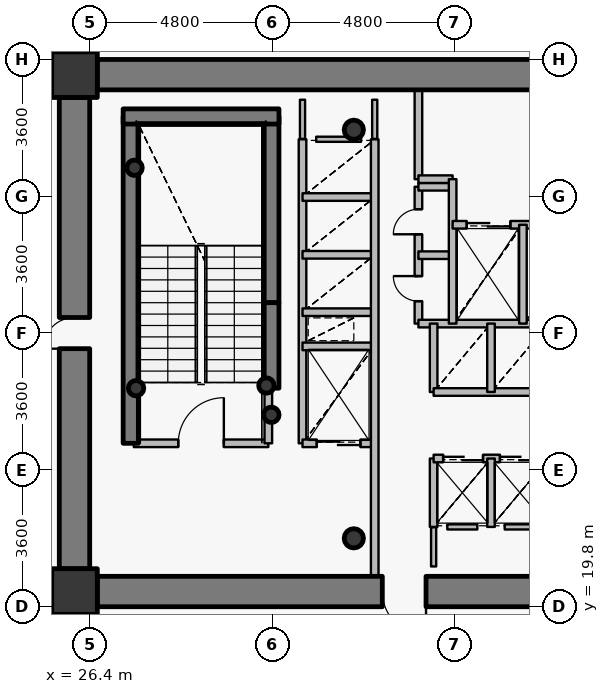
"""IFC4 building model, lengths in metres.
Left out: names, types, materials, properties, quantities, classifications, styles, units other than length and angle.
Written with IfcOpenShell. Run it as: python <this file> out.ifc"""

import sys

from ifc_helpers import new_model, si_unit, direction, frame, frame_2d, origin, origin_2d, place, context, subcontext, project, spatial, rectangle, hollow_circle, extrude, source, transform, mapped, element, fill, save


model = new_model("IFC4")
c1 = context("Model", 3, precision=1e-05, world=origin(), true_north=direction((0.0, 1.0)))
c2 = subcontext(c1, "Body", "Model", "MODEL_VIEW")
j1 = project(units=[si_unit("LENGTHUNIT", "METRE"), si_unit("PLANEANGLEUNIT", "RADIAN")], contexts=[c1])
p1 = place(None, origin())
s1 = spatial("IfcSite", under=j1, at=p1, CompositionType="ELEMENT")
p2 = place(p1, origin())
s2 = spatial("IfcBuilding", under=s1, at=p2, CompositionType="ELEMENT")
p3 = place(p2, frame((0.0, 0.0, 100.95)))
s3 = spatial("IfcBuildingStorey", under=s2, at=p3, CompositionType="ELEMENT", Elevation=100.95)
for number, where, z_axis, x_axis in (
    (1, (26.0, 20.2, 0.0), (0.0, 0.0, 1.0), (1.0, 0.0, 0.0)),
    (2, (26.0, 33.8, 0.0), (0.0, 0.0, 1.0), (1.0, 0.0, 0.0)),
):
    element("IfcColumn", number, at=place(p3, frame(where, z_axis=z_axis, x_axis=x_axis)), inside=s3, PredefinedType="COLUMN", context=c2, shape_type="SweptSolid", body=[
        extrude(rectangle(XDim=1.2, YDim=1.2, at=origin_2d()), origin(), (0.0, 0.0, 1.0), 3.75),
    ])
for number, where, z_axis, x_axis in (
    (3, (33.35, 21.6, 0.0), (0.0, 0.0, 1.0), (1.0, 0.0, 0.0)),
    (4, (33.35, 32.35, 0.0), (0.0, 0.0, 1.0), (1.0, 0.0, 0.0)),
):
    element("IfcColumn", number, at=place(p3, frame(where, z_axis=z_axis, x_axis=x_axis)), inside=s3, PredefinedType="COLUMN", context=c2, shape_type="SweptSolid", body=[
        extrude(hollow_circle(Radius=0.254, WallThickness=0.02, at=origin_2d()), origin(), (0.0, 0.0, 1.0), 3.75),
    ])
p4 = place(p3, frame((27.48, 24.1, 0.0), z_axis=(0.0, 0.0, 1.0), x_axis=(0.0, 1.0, 0.0)))
e5 = element("IfcWall", 5, at=p4, inside=s3, PredefinedType="SHEAR", context=c2, shape_type="SweptSolid", body=[
    extrude(rectangle(XDim=8.6, YDim=0.4, at=frame_2d((4.3, 0.0))), origin(), (0.0, 0.0, 1.0), 3.75),
])
p5 = place(p3, frame((31.18, 27.8, 0.0), z_axis=(0.0, 0.0, 1.0), x_axis=(0.0, 1.0, 0.0)))
e6 = element("IfcWall", 6, at=p5, inside=s3, PredefinedType="SHEAR", context=c2, shape_type="SweptSolid", body=[
    extrude(rectangle(XDim=4.9, YDim=0.4, at=frame_2d((2.45, 0.0))), origin(), (0.0, 0.0, 1.0), 3.75),
])
p6 = place(p3, frame((27.28, 32.7, 0.0), z_axis=(0.0, 0.0, 1.0), x_axis=(1.0, 0.0, 0.0)))
e7 = element("IfcWall", 7, at=p6, inside=s3, PredefinedType="SHEAR", context=c2, shape_type="SweptSolid", body=[
    extrude(rectangle(XDim=4.1, YDim=0.4, at=frame_2d((2.05, 0.0))), origin(), (0.0, 0.0, 1.0), 3.75),
])
for number, where, z_axis, x_axis in (
    (8, (27.58, 31.35, 0.0), (0.0, 0.0, 1.0), (1.0, 0.0, 0.0)),
    (9, (31.05, 25.62, 0.0), (0.0, 0.0, 1.0), (1.0, 0.0, 0.0)),
    (10, (31.18, 24.85, 0.0), (0.0, 0.0, 1.0), (1.0, 0.0, 0.0)),
    (11, (27.62, 25.55, 0.0), (0.0, 0.0, 1.0), (1.0, 0.0, 0.0)),
):
    element("IfcColumn", number, at=place(p3, frame(where, z_axis=z_axis, x_axis=x_axis)), inside=s3, PredefinedType="COLUMN", context=c2, shape_type="SweptSolid", body=[
        extrude(hollow_circle(Radius=0.203, WallThickness=0.016, at=origin_2d()), origin(), (0.0, 0.0, 1.0), 3.75),
    ])
p7 = place(p3, frame((26.6, 33.8, 0.0), z_axis=(0.0, 0.0, 1.0), x_axis=(1.0, 0.0, 0.0)))
e12 = element("IfcWall", 12, at=p7, inside=s3, PredefinedType="SHEAR", context=c2, shape_type="SweptSolid", body=[
    extrude(rectangle(XDim=18.8, YDim=0.8, at=frame_2d((9.4, 0.0))), origin(), (0.0, 0.0, 1.0), 2.95),
])
p8 = place(p3, frame((45.4, 20.2, 0.0), z_axis=(0.0, 0.0, 1.0), x_axis=(-1.0, 0.0, 0.0)))
e13 = element("IfcWall", 13, at=p8, inside=s3, PredefinedType="SHEAR", context=c2, shape_type="SweptSolid", body=[
    extrude(rectangle(XDim=18.8, YDim=0.8, at=frame_2d((9.4, 0.0))), origin(), (0.0, 0.0, 1.0), 2.95),
])
p9 = place(p8, frame((10.15, 0.0, 0.0)))
e14 = element("IfcOpeningElement", 14, at=p9, cuts=e13, PredefinedType="OPENING", context=c2, shape_type="SweptSolid", body=[
    extrude(rectangle(XDim=1.15, YDim=2.15, at=origin_2d()), frame((0.575, 0.41, 1.075), z_axis=(0.0, -1.0, 0.0), x_axis=(1.0, 0.0, 0.0)), (0.0, 0.0, 1.0), 0.82),
])
p10 = place(p3, frame((26.0, 20.8, 0.0), z_axis=(0.0, 0.0, 1.0), x_axis=(0.0, 1.0, 0.0)))
e15 = element("IfcWall", 15, at=p10, inside=s3, PredefinedType="SHEAR", context=c2, shape_type="SweptSolid", body=[
    extrude(rectangle(XDim=12.4, YDim=0.8, at=frame_2d((6.2, 0.0))), origin(), (0.0, 0.0, 1.0), 2.95),
])
p11 = place(p10, frame((5.79, 0.0, 0.0)))
e16 = element("IfcOpeningElement", 16, at=p11, cuts=e15, PredefinedType="OPENING", context=c2, shape_type="SweptSolid", body=[
    extrude(rectangle(XDim=0.82, YDim=2.1, at=origin_2d()), frame((0.41, 0.41, 1.05), z_axis=(0.0, -1.0, 0.0), x_axis=(1.0, 0.0, 0.0)), (0.0, 0.0, 1.0), 0.82),
])
p12 = place(p3, frame((31.18, 25.55, 0.0), z_axis=(0.0, 0.0, 1.0), x_axis=(0.0, 1.0, 0.0)))
e17 = element("IfcWall", 17, at=p12, inside=s3, PredefinedType="SHEAR", context=c2, shape_type="SweptSolid", body=[
    extrude(rectangle(XDim=2.25, YDim=0.4, at=frame_2d((1.125, 0.0))), origin(), (0.0, 0.0, 1.0), 3.1),
])
p13 = place(p3, frame((27.56, 24.1, 0.0), z_axis=(0.0, 0.0, 1.0), x_axis=(1.0, 0.0, 0.0)))
e18 = element("IfcWall", 18, at=p13, inside=s3, PredefinedType="PARTITIONING", context=c2, shape_type="SweptSolid", body=[
    extrude(rectangle(XDim=3.54, YDim=0.2, at=frame_2d((1.77, 0.0))), origin(), (0.0, 0.0, 1.0), 3.5),
])
p14 = place(p13, frame((1.17, 0.0, 0.0)))
e19 = element("IfcOpeningElement", 19, at=p14, cuts=e18, PredefinedType="OPENING", context=c2, shape_type="SweptSolid", body=[
    extrude(rectangle(XDim=1.2, YDim=2.15, at=origin_2d()), frame((0.6, 0.11, 1.075), z_axis=(0.0, -1.0, 0.0), x_axis=(1.0, 0.0, 0.0)), (0.0, 0.0, 1.0), 0.22),
])
p15 = place(p3, frame((31.1, 24.1, 0.0), z_axis=(0.0, 0.0, 1.0), x_axis=(0.0, 1.0, 0.0)))
e20 = element("IfcWall", 20, at=p15, inside=s3, PredefinedType="PARTITIONING", context=c2, shape_type="SweptSolid", body=[
    extrude(rectangle(XDim=1.44, YDim=0.2, at=frame_2d((0.72, 0.0))), origin(), (0.0, 0.0, 1.0), 3.5),
])
p16 = place(p3, frame((32.0, 24.1, 0.0), z_axis=(0.0, 0.0, 1.0), x_axis=(0.0, 1.0, 0.0)))
e21 = element("IfcWall", 21, at=p16, inside=s3, PredefinedType="PARTITIONING", context=c2, shape_type="SweptSolid", body=[
    extrude(rectangle(XDim=8.0, YDim=0.2, at=frame_2d((4.0, 0.0))), origin(), (0.0, 0.0, 1.0), 3.5),
])
p17 = place(p3, frame((32.0, 24.1, 0.0), z_axis=(0.0, 0.0, 1.0), x_axis=(1.0, 0.0, 0.0)))
e22 = element("IfcWall", 22, at=p17, inside=s3, PredefinedType="PARTITIONING", context=c2, shape_type="SweptSolid", body=[
    extrude(rectangle(XDim=1.9, YDim=0.2, at=frame_2d((0.95, 0.0))), origin(), (0.0, 0.0, 1.0), 3.085),
])
p18 = place(p17, frame((0.375, 0.0, 0.0)))
e23 = element("IfcOpeningElement", 23, at=p18, cuts=e22, PredefinedType="OPENING", context=c2, shape_type="SweptSolid", body=[
    extrude(rectangle(XDim=1.15, YDim=2.15, at=origin_2d()), frame((0.575, 0.11, 1.075), z_axis=(0.0, -1.0, 0.0), x_axis=(1.0, 0.0, 0.0)), (0.0, 0.0, 1.0), 0.22),
])
for number, where, z_axis, x_axis in (
    (24, (32.0, 26.65, 0.0), (0.0, 0.0, 1.0), (1.0, 0.0, 0.0)),
    (25, (32.0, 27.55, 0.0), (0.0, 0.0, 1.0), (1.0, 0.0, 0.0)),
    (26, (32.0, 29.06, 0.0), (0.0, 0.0, 1.0), (1.0, 0.0, 0.0)),
    (27, (32.0, 30.58, 0.0), (0.0, 0.0, 1.0), (1.0, 0.0, 0.0)),
):
    element("IfcWall", number, at=place(p3, frame(where, z_axis=z_axis, x_axis=x_axis)), inside=s3, PredefinedType="PARTITIONING", context=c2, shape_type="SweptSolid", body=[
        extrude(rectangle(XDim=1.9, YDim=0.2, at=frame_2d((0.95, 0.0))), origin(), (0.0, 0.0, 1.0), 3.085),
    ])
p19 = place(p3, frame((33.9, 20.6, 0.0), z_axis=(0.0, 0.0, 1.0), x_axis=(0.0, 1.0, 0.0)))
e28 = element("IfcWall", 28, at=p19, inside=s3, PredefinedType="PARTITIONING", context=c2, shape_type="SweptSolid", body=[
    extrude(rectangle(XDim=11.5, YDim=0.2, at=frame_2d((5.75, 0.0))), origin(), (0.0, 0.0, 1.0), 3.085),
])
p20 = place(p3, frame((35.05, 27.25, 0.0), z_axis=(0.0, 0.0, 1.0), x_axis=(0.0, 1.0, 0.0)))
e29 = element("IfcWall", 29, at=p20, inside=s3, PredefinedType="PARTITIONING", context=c2, shape_type="SweptSolid", body=[
    extrude(rectangle(XDim=3.6, YDim=0.2, at=frame_2d((1.8, 0.0))), origin(), (0.0, 0.0, 1.0), 3.5),
])
p21 = place(p20, frame((0.59, 0.0, 0.0)))
e30 = element("IfcOpeningElement", 30, at=p21, cuts=e29, PredefinedType="OPENING", context=c2, shape_type="SweptSolid", body=[
    extrude(rectangle(XDim=0.66, YDim=2.05, at=origin_2d()), frame((0.33, 0.11, 1.025), z_axis=(0.0, -1.0, 0.0), x_axis=(1.0, 0.0, 0.0)), (0.0, 0.0, 1.0), 0.22),
])
p22 = place(p20, frame((2.35, 0.0, 0.0)))
e31 = element("IfcOpeningElement", 31, at=p22, cuts=e29, PredefinedType="OPENING", context=c2, shape_type="SweptSolid", body=[
    extrude(rectangle(XDim=0.66, YDim=2.05, at=origin_2d()), frame((0.33, 0.11, 1.025), z_axis=(0.0, -1.0, 0.0), x_axis=(1.0, 0.0, 0.0)), (0.0, 0.0, 1.0), 0.22),
])
p23 = place(p3, frame((35.05, 27.25, 0.0), z_axis=(0.0, 0.0, 1.0), x_axis=(1.0, 0.0, 0.0)))
e32 = element("IfcWall", 32, at=p23, inside=s3, PredefinedType="PARTITIONING", context=c2, shape_type="SweptSolid", body=[
    extrude(rectangle(XDim=4.95, YDim=0.2, at=frame_2d((2.475, 0.0))), origin(), (0.0, 0.0, 1.0), 3.085),
])
for number, where, z_axis, x_axis in (
    (33, (35.05, 29.05, 0.0), (0.0, 0.0, 1.0), (1.0, 0.0, 0.0)),
    (34, (35.05, 30.85, 0.0), (0.0, 0.0, 1.0), (1.0, 0.0, 0.0)),
):
    element("IfcWall", number, at=place(p3, frame(where, z_axis=z_axis, x_axis=x_axis)), inside=s3, PredefinedType="PARTITIONING", context=c2, shape_type="SweptSolid", body=[
        extrude(rectangle(XDim=0.9, YDim=0.2, at=frame_2d((0.45, 0.0))), origin(), (0.0, 0.0, 1.0), 3.5),
    ])
p24 = place(p3, frame((35.05, 31.05, 0.0), z_axis=(0.0, 0.0, 1.0), x_axis=(0.0, 1.0, 0.0)))
e35 = element("IfcWall", 35, at=p24, inside=s3, PredefinedType="PARTITIONING", context=c2, shape_type="SweptSolid", body=[
    extrude(rectangle(XDim=2.35, YDim=0.2, at=frame_2d((1.175, 0.0))), origin(), (0.0, 0.0, 1.0), 3.085),
])
p25 = place(p3, frame((35.05, 31.05, 0.0), z_axis=(0.0, 0.0, 1.0), x_axis=(1.0, 0.0, 0.0)))
e36 = element("IfcWall", 36, at=p25, inside=s3, PredefinedType="PARTITIONING", context=c2, shape_type="SweptSolid", body=[
    extrude(rectangle(XDim=0.9, YDim=0.2, at=frame_2d((0.45, 0.0))), origin(), (0.0, 0.0, 1.0), 3.5),
])
p26 = place(p3, frame((35.45, 21.9, 0.0), z_axis=(0.0, 0.0, 1.0), x_axis=(0.0, 1.0, 0.0)))
e37 = element("IfcWall", 37, at=p26, inside=s3, PredefinedType="PARTITIONING", context=c2, shape_type="SweptSolid", body=[
    extrude(rectangle(XDim=1.8, YDim=0.2, at=frame_2d((0.9, 0.0))), origin(), (0.0, 0.0, 1.0), 3.5),
])
p27 = place(p3, frame((35.45, 23.7, 0.0), z_axis=(0.0, 0.0, 1.0), x_axis=(1.0, 0.0, 0.0)))
e38 = element("IfcWall", 38, at=p27, inside=s3, PredefinedType="PARTITIONING", context=c2, shape_type="SweptSolid", body=[
    extrude(rectangle(XDim=4.55, YDim=0.2, at=frame_2d((2.275, 0.0))), origin(), (0.0, 0.0, 1.0), 3.085),
])
p28 = place(p27, frame((0.25, 0.0, 0.0)))
e39 = element("IfcOpeningElement", 39, at=p28, cuts=e38, PredefinedType="OPENING", context=c2, shape_type="SweptSolid", body=[
    extrude(rectangle(XDim=1.05, YDim=2.15, at=origin_2d()), frame((0.525, 0.11, 1.075), z_axis=(0.0, -1.0, 0.0), x_axis=(1.0, 0.0, 0.0)), (0.0, 0.0, 1.0), 0.22),
])
p29 = place(p27, frame((1.745, 0.0, 0.0)))
e40 = element("IfcOpeningElement", 40, at=p29, cuts=e38, PredefinedType="OPENING", context=c2, shape_type="SweptSolid", body=[
    extrude(rectangle(XDim=1.05, YDim=2.15, at=origin_2d()), frame((0.525, 0.11, 1.075), z_axis=(0.0, -1.0, 0.0), x_axis=(1.0, 0.0, 0.0)), (0.0, 0.0, 1.0), 0.22),
])
p30 = place(p27, frame((3.165, 0.0, 0.0)))
e41 = element("IfcOpeningElement", 41, at=p30, cuts=e38, PredefinedType="OPENING", context=c2, shape_type="SweptSolid", body=[
    extrude(rectangle(XDim=1.05, YDim=2.15, at=origin_2d()), frame((0.525, 0.11, 1.075), z_axis=(0.0, -1.0, 0.0), x_axis=(1.0, 0.0, 0.0)), (0.0, 0.0, 1.0), 0.22),
])
p31 = place(p3, frame((35.45, 25.45, 0.0), z_axis=(0.0, 0.0, 1.0), x_axis=(0.0, 1.0, 0.0)))
e42 = element("IfcWall", 42, at=p31, inside=s3, PredefinedType="PARTITIONING", context=c2, shape_type="SweptSolid", body=[
    extrude(rectangle(XDim=1.8, YDim=0.2, at=frame_2d((0.9, 0.0))), origin(), (0.0, 0.0, 1.0), 3.5),
])
p32 = place(p3, frame((35.45, 25.45, 0.0), z_axis=(0.0, 0.0, 1.0), x_axis=(1.0, 0.0, 0.0)))
e43 = element("IfcWall", 43, at=p32, inside=s3, PredefinedType="PARTITIONING", context=c2, shape_type="SweptSolid", body=[
    extrude(rectangle(XDim=4.55, YDim=0.2, at=frame_2d((2.275, 0.0))), origin(), (0.0, 0.0, 1.0), 3.085),
])
p33 = place(p3, frame((35.95, 27.25, 0.0), z_axis=(0.0, 0.0, 1.0), x_axis=(0.0, 1.0, 0.0)))
e44 = element("IfcWall", 44, at=p33, inside=s3, PredefinedType="PARTITIONING", context=c2, shape_type="SweptSolid", body=[
    extrude(rectangle(XDim=3.8, YDim=0.2, at=frame_2d((1.9, 0.0))), origin(), (0.0, 0.0, 1.0), 3.5),
])
p34 = place(p3, frame((35.95, 29.85, 0.0), z_axis=(0.0, 0.0, 1.0), x_axis=(1.0, 0.0, 0.0)))
e45 = element("IfcWall", 45, at=p34, inside=s3, PredefinedType="PARTITIONING", context=c2, shape_type="SweptSolid", body=[
    extrude(rectangle(XDim=8.49, YDim=0.2, at=frame_2d((4.245, 0.0))), origin(), (0.0, 0.0, 1.0), 3.085),
])
p35 = place(p34, frame((6.1, 0.0, 0.0)))
e46 = element("IfcOpeningElement", 46, at=p35, cuts=e45, PredefinedType="OPENING", context=c2, shape_type="SweptSolid", body=[
    extrude(rectangle(XDim=1.2, YDim=2.15, at=origin_2d()), frame((0.6, 0.11, 1.075), z_axis=(0.0, -1.0, 0.0), x_axis=(1.0, 0.0, 0.0)), (0.0, 0.0, 1.0), 0.22),
])
p36 = place(p34, frame((0.37, 0.0, 0.0)))
e47 = element("IfcOpeningElement", 47, at=p36, cuts=e45, PredefinedType="OPENING", context=c2, shape_type="SweptSolid", body=[
    extrude(rectangle(XDim=1.15, YDim=2.15, at=origin_2d()), frame((0.575, 0.11, 1.075), z_axis=(0.0, -1.0, 0.0), x_axis=(1.0, 0.0, 0.0)), (0.0, 0.0, 1.0), 0.22),
])
p37 = place(p34, frame((2.425, 0.0, 0.0)))
e48 = element("IfcOpeningElement", 48, at=p37, cuts=e45, PredefinedType="OPENING", context=c2, shape_type="SweptSolid", body=[
    extrude(rectangle(XDim=1.05, YDim=2.15, at=origin_2d()), frame((0.525, 0.11, 1.075), z_axis=(0.0, -1.0, 0.0), x_axis=(1.0, 0.0, 0.0)), (0.0, 0.0, 1.0), 0.22),
])
for number, where, z_axis, x_axis in (
    (49, (36.96, 21.9, 0.0), (0.0, 0.0, 1.0), (0.0, 1.0, 0.0)),
    (50, (36.96, 25.45, 0.0), (0.0, 0.0, 1.0), (0.0, 1.0, 0.0)),
):
    element("IfcWall", number, at=place(p3, frame(where, z_axis=z_axis, x_axis=x_axis)), inside=s3, PredefinedType="PARTITIONING", context=c2, shape_type="SweptSolid", body=[
        extrude(rectangle(XDim=1.8, YDim=0.2, at=frame_2d((0.9, 0.0))), origin(), (0.0, 0.0, 1.0), 3.5),
    ])
p38 = place(p3, frame((37.8, 27.25, 0.0), z_axis=(0.0, 0.0, 1.0), x_axis=(0.0, 1.0, 0.0)))
e51 = element("IfcWall", 51, at=p38, inside=s3, PredefinedType="PARTITIONING", context=c2, shape_type="SweptSolid", body=[
    extrude(rectangle(XDim=2.6, YDim=0.2, at=frame_2d((1.3, 0.0))), origin(), (0.0, 0.0, 1.0), 3.5),
])
p39 = place(p3, frame((36.6, 21.9, 0.0), z_axis=(0.0, 0.0, 1.0), x_axis=(-1.0, 0.0, 0.0)))
e52 = element("IfcWall", 52, at=p39, inside=s3, PredefinedType="PARTITIONING", context=c2, shape_type="SweptSolid", body=[
    extrude(rectangle(XDim=0.79, YDim=0.135, at=frame_2d((0.395, 0.0))), origin(), (0.0, 0.0, 1.0), 3.5),
])
p40 = place(p3, frame((38.12, 21.9, 0.0), z_axis=(0.0, 0.0, 1.0), x_axis=(-1.0, 0.0, 0.0)))
e53 = element("IfcWall", 53, at=p40, inside=s3, PredefinedType="PARTITIONING", context=c2, shape_type="SweptSolid", body=[
    extrude(rectangle(XDim=0.8, YDim=0.135, at=frame_2d((0.4, 0.0))), origin(), (0.0, 0.0, 1.0), 3.5),
])
p41 = place(p3, frame((32.36, 32.1, 0.0), z_axis=(0.0, 0.0, 1.0), x_axis=(1.0, 0.0, 0.0)))
e54 = element("IfcWall", 54, at=p41, inside=s3, PredefinedType="PARTITIONING", context=c2, shape_type="SweptSolid", body=[
    extrude(rectangle(XDim=1.18, YDim=0.135, at=frame_2d((0.59, 0.0))), origin(), (0.0, 0.0, 1.0), 3.085),
])
p42 = place(p3, frame((32.0, 33.14, 0.0), z_axis=(0.0, 0.0, 1.0), x_axis=(0.0, -1.0, 0.0)))
e55 = element("IfcWall", 55, at=p42, inside=s3, PredefinedType="PARTITIONING", context=c2, shape_type="SweptSolid", body=[
    extrude(rectangle(XDim=1.03, YDim=0.135, at=frame_2d((0.515, 0.0))), origin(), (0.0, 0.0, 1.0), 3.035),
])
for number, where, z_axis, x_axis in (
    (56, (35.45, 21.89, 0.0), (0.0, 0.0, 1.0), (0.0, -1.0, 0.0)),
    (57, (33.9, 32.11, 0.0), (0.0, 0.0, 1.0), (0.0, 1.0, 0.0)),
):
    element("IfcWall", number, at=place(p3, frame(where, z_axis=z_axis, x_axis=x_axis)), inside=s3, PredefinedType="PARTITIONING", context=c2, shape_type="SweptSolid", body=[
        extrude(rectangle(XDim=1.03, YDim=0.135, at=frame_2d((0.515, 0.0))), origin(), (0.0, 0.0, 1.0), 3.085),
    ])
p43 = place(p3, frame((26.59, 34.2, 0.0), z_axis=(0.0, 0.0, 1.0), x_axis=(-1.0, 0.0, 0.0)))
e58 = element("IfcWall", 58, at=p43, inside=s3, PredefinedType="PARTITIONING", context=c2, shape_type="SweptSolid", body=[
    extrude(rectangle(XDim=0.99, YDim=0.135, at=frame_2d((0.495, 0.0))), origin(), (0.0, 0.0, 1.0), 2.935),
])
p44 = place(p3, frame((25.6, 33.893, 0.0), z_axis=(0.0, 0.0, 1.0), x_axis=(0.0, -1.0, 0.0)))
e59 = element("IfcWall", 59, at=p44, inside=s3, PredefinedType="PARTITIONING", context=c2, shape_type="SweptSolid", body=[
    extrude(rectangle(XDim=0.683, YDim=0.135, at=frame_2d((0.341, 0.0))), origin(), (0.0, 0.0, 1.0), 3.5),
])
p45 = place(p3, frame((25.6, 20.79, 0.0), z_axis=(0.0, 0.0, 1.0), x_axis=(0.0, -1.0, 0.0)))
e60 = element("IfcWall", 60, at=p45, inside=s3, PredefinedType="PARTITIONING", context=c2, shape_type="SweptSolid", body=[
    extrude(rectangle(XDim=0.99, YDim=0.135, at=frame_2d((0.495, 0.0))), origin(), (0.0, 0.0, 1.0), 3.5),
])
p46 = place(p3, frame((25.907, 19.8, 0.0), z_axis=(0.0, 0.0, 1.0), x_axis=(1.0, 0.0, 0.0)))
e61 = element("IfcWall", 61, at=p46, inside=s3, PredefinedType="PARTITIONING", context=c2, shape_type="SweptSolid", body=[
    extrude(rectangle(XDim=0.683, YDim=0.135, at=frame_2d((0.341, 0.0))), origin(), (0.0, 0.0, 1.0), 2.935),
])
m1 = source(origin(), c2, "Body", "SweptSolid", [
    extrude(rectangle(XDim=0.82, YDim=2.1, at=origin_2d()), frame((0.41, 0.025, 1.05), z_axis=(0.0, -1.0, 0.0), x_axis=(1.0, 0.0, 0.0)), (0.0, 0.0, 1.0), 0.05),
])
p47 = place(p11, origin())
e62 = element("IfcDoor", 62, at=p47, inside=s3, OperationType="SINGLE_SWING_LEFT", PredefinedType="DOOR", context=c2, shape_type="MappedRepresentation", body=[
    mapped(m1, transform((0.0, 0.0, 0.0), x_axis=(1.0, 0.0, 0.0), y_axis=(0.0, 1.0, 0.0), z_axis=(0.0, 0.0, 1.0), scale=1.0)),
])
fill(e16, e62)
m2 = source(origin(), c2, "Body", "SweptSolid", [
    extrude(rectangle(XDim=1.15, YDim=2.15, at=origin_2d()), frame((0.575, 0.025, 1.075), z_axis=(0.0, -1.0, 0.0), x_axis=(1.0, 0.0, 0.0)), (0.0, 0.0, 1.0), 0.05),
])
p48 = place(p9, origin())
e63 = element("IfcDoor", 63, at=p48, inside=s3, OperationType="SINGLE_SWING_LEFT", PredefinedType="DOOR", context=c2, shape_type="MappedRepresentation", body=[
    mapped(m2, transform((0.0, 0.0, 0.0), x_axis=(1.0, 0.0, 0.0), y_axis=(0.0, 1.0, 0.0), z_axis=(0.0, 0.0, 1.0), scale=1.0)),
])
fill(e14, e63)
m3 = source(origin(), c2, "Body", "SweptSolid", [
    extrude(rectangle(XDim=1.2, YDim=2.15, at=origin_2d()), frame((0.6, 0.025, 1.075), z_axis=(0.0, -1.0, 0.0), x_axis=(1.0, 0.0, 0.0)), (0.0, 0.0, 1.0), 0.05),
])
p49 = place(p14, origin())
e64 = element("IfcDoor", 64, at=p49, inside=s3, OperationType="SINGLE_SWING_RIGHT", PredefinedType="DOOR", context=c2, shape_type="MappedRepresentation", body=[
    mapped(m3, transform((0.0, 0.0, 0.0), x_axis=(1.0, 0.0, 0.0), y_axis=(0.0, 1.0, 0.0), z_axis=(0.0, 0.0, 1.0), scale=1.0)),
])
fill(e19, e64)
m4 = source(origin(), c2, "Body", "SweptSolid", [
    extrude(rectangle(XDim=1.15, YDim=2.15, at=origin_2d()), frame((0.575, 0.025, 1.075), z_axis=(0.0, -1.0, 0.0), x_axis=(1.0, 0.0, 0.0)), (0.0, 0.0, 1.0), 0.05),
])
p50 = place(p36, origin())
e65 = element("IfcDoor", 65, at=p50, inside=s3, OperationType="DOUBLE_DOOR_SLIDING", PredefinedType="USERDEFINED", context=c2, shape_type="MappedRepresentation", body=[
    mapped(m4, transform((0.0, 0.0, 0.0), x_axis=(1.0, 0.0, 0.0), y_axis=(0.0, 1.0, 0.0), z_axis=(0.0, 0.0, 1.0), scale=1.0)),
])
fill(e47, e65)
p51 = place(p18, origin())
e66 = element("IfcDoor", 66, at=p51, inside=s3, OperationType="DOUBLE_DOOR_SLIDING", PredefinedType="USERDEFINED", context=c2, shape_type="MappedRepresentation", body=[
    mapped(m4, transform((0.0, 0.0, 0.0), x_axis=(1.0, 0.0, 0.0), y_axis=(0.0, 1.0, 0.0), z_axis=(0.0, 0.0, 1.0), scale=1.0)),
])
fill(e23, e66)
m5 = source(origin(), c2, "Body", "SweptSolid", [
    extrude(rectangle(XDim=1.05, YDim=2.15, at=origin_2d()), frame((0.525, 0.025, 1.075), z_axis=(0.0, -1.0, 0.0), x_axis=(1.0, 0.0, 0.0)), (0.0, 0.0, 1.0), 0.05),
])
p52 = place(p28, origin())
e67 = element("IfcDoor", 67, at=p52, inside=s3, OperationType="DOUBLE_DOOR_SLIDING", PredefinedType="USERDEFINED", context=c2, shape_type="MappedRepresentation", body=[
    mapped(m5, transform((0.0, 0.0, 0.0), x_axis=(1.0, 0.0, 0.0), y_axis=(0.0, 1.0, 0.0), z_axis=(0.0, 0.0, 1.0), scale=1.0)),
])
fill(e39, e67)
p53 = place(p29, origin())
e68 = element("IfcDoor", 68, at=p53, inside=s3, OperationType="DOUBLE_DOOR_SLIDING", PredefinedType="USERDEFINED", context=c2, shape_type="MappedRepresentation", body=[
    mapped(m5, transform((0.0, 0.0, 0.0), x_axis=(1.0, 0.0, 0.0), y_axis=(0.0, 1.0, 0.0), z_axis=(0.0, 0.0, 1.0), scale=1.0)),
])
fill(e40, e68)
m6 = source(origin(), c2, "Body", "SweptSolid", [
    extrude(rectangle(XDim=0.66, YDim=2.05, at=origin_2d()), frame((0.33, 0.025, 1.025), z_axis=(0.0, -1.0, 0.0), x_axis=(1.0, 0.0, 0.0)), (0.0, 0.0, 1.0), 0.05),
])
p54 = place(p21, origin())
e69 = element("IfcDoor", 69, at=p54, inside=s3, OperationType="SINGLE_SWING_RIGHT", PredefinedType="USERDEFINED", context=c2, shape_type="MappedRepresentation", body=[
    mapped(m6, transform((0.0, 0.0, 0.0), x_axis=(1.0, 0.0, 0.0), y_axis=(0.0, 1.0, 0.0), z_axis=(0.0, 0.0, 1.0), scale=1.0)),
])
fill(e30, e69)
p55 = place(p22, origin())
e70 = element("IfcDoor", 70, at=p55, inside=s3, OperationType="SINGLE_SWING_LEFT", PredefinedType="USERDEFINED", context=c2, shape_type="MappedRepresentation", body=[
    mapped(m6, transform((0.0, 0.0, 0.0), x_axis=(1.0, 0.0, 0.0), y_axis=(0.0, 1.0, 0.0), z_axis=(0.0, 0.0, 1.0), scale=1.0)),
])
fill(e31, e70)
save(model, sys.argv[1])
